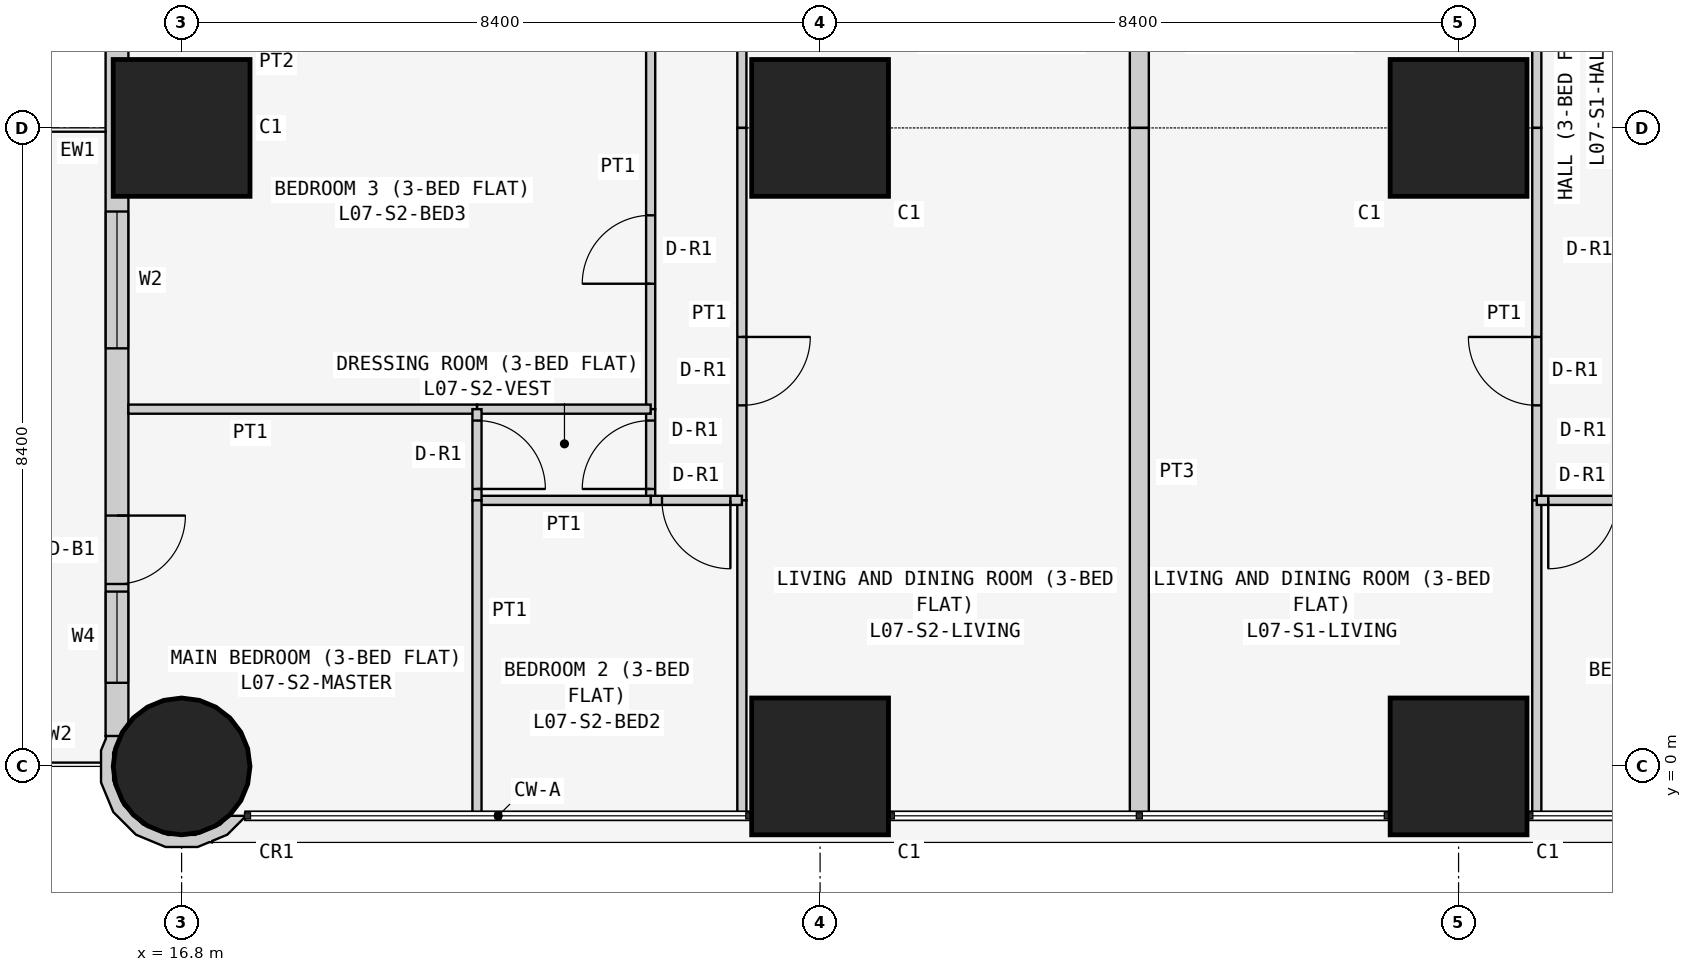
"""IFC4 building model, lengths in metres.
Left out: names, types, materials, properties, quantities, classifications, styles, units other than length and angle.
Written with IfcOpenShell. Run it as: python <this file> out.ifc"""

import sys

from ifc_helpers import new_model, si_unit, direction, frame, frame_2d, origin, origin_2d, place, context, subcontext, project, spatial, polyline, rectangle, circle, outline, extrude, element, fill, save


model = new_model("IFC4")
c1 = context("Model", 3, precision=1e-05, world=origin(), true_north=direction((0.0, 1.0)))
c2 = subcontext(c1, "Body", "Model", "MODEL_VIEW")
j1 = project(units=[si_unit("LENGTHUNIT", "METRE"), si_unit("PLANEANGLEUNIT", "RADIAN")], contexts=[c1])
p1 = place(None, origin())
s1 = spatial("IfcSite", under=j1, at=p1, CompositionType="ELEMENT")
p2 = place(p1, origin())
s2 = spatial("IfcBuilding", under=s1, at=p2, CompositionType="ELEMENT")
p3 = place(p2, frame((0.0, 0.0, 34.5)))
s3 = spatial("IfcBuildingStorey", under=s2, at=p3, CompositionType="ELEMENT", Elevation=34.5)
p4 = place(p3, frame((16.8, 0.0, 0.0), z_axis=(0.0, 0.0, 1.0), x_axis=(1.0, 0.0, 0.0)))
e1 = element("IfcColumn", 1, at=p4, inside=s3, PredefinedType="COLUMN", context=c2, shape_type="SweptSolid", body=[
    extrude(circle(Radius=0.9, at=origin_2d()), origin(), (0.0, 0.0, 1.0), 3.6),
])
for number, where, z_axis, x_axis in (
    (2, (16.8, 8.4, 0.0), (0.0, 0.0, 1.0), (1.0, 0.0, 0.0)),
    (3, (25.2, 0.0, 0.0), (0.0, 0.0, 1.0), (1.0, 0.0, 0.0)),
    (4, (25.2, 8.4, 0.0), (0.0, 0.0, 1.0), (1.0, 0.0, 0.0)),
    (5, (33.6, 0.0, 0.0), (0.0, 0.0, 1.0), (1.0, 0.0, 0.0)),
    (6, (33.6, 8.4, 0.0), (0.0, 0.0, 1.0), (1.0, 0.0, 0.0)),
):
    element("IfcColumn", number, at=place(p3, frame(where, z_axis=z_axis, x_axis=x_axis)), inside=s3, PredefinedType="COLUMN", context=c2, shape_type="SweptSolid", body=[
        extrude(rectangle(XDim=1.8, YDim=1.8, at=origin_2d()), origin(), (0.0, 0.0, 1.0), 3.6),
    ])
p5 = place(p3, frame((15.95, 15.8, 0.0), z_axis=(0.0, 0.0, 1.0), x_axis=(0.0, -1.0, 0.0)))
e7 = element("IfcWall", 7, at=p5, inside=s3, PredefinedType="SOLIDWALL", context=c2, shape_type="SweptSolid", body=[
    extrude(rectangle(XDim=15.4, YDim=0.3, at=frame_2d((7.7, 0.0))), origin(), (0.0, 0.0, 1.0), 3.45),
])
p6 = place(p5, frame((1.2, 0.0, 0.9)))
e8 = element("IfcOpeningElement", 8, at=p6, cuts=e7, PredefinedType="OPENING", context=c2, shape_type="SweptSolid", body=[
    extrude(rectangle(XDim=1.8, YDim=1.5, at=frame_2d((0.9, 0.75))), frame((0.0, 0.16, 0.0), z_axis=(0.0, -1.0, 0.0), x_axis=(1.0, 0.0, 0.0)), (0.0, 0.0, 1.0), 0.32),
])
p7 = place(p5, frame((4.95, 0.0, 1.5)))
e9 = element("IfcOpeningElement", 9, at=p7, cuts=e7, PredefinedType="OPENING", context=c2, shape_type="SweptSolid", body=[
    extrude(rectangle(XDim=0.9, YDim=0.7, at=frame_2d((0.45, 0.35))), frame((0.0, 0.16, 0.0), z_axis=(0.0, -1.0, 0.0), x_axis=(1.0, 0.0, 0.0)), (0.0, 0.0, 1.0), 0.32),
])
p8 = place(p5, frame((8.5, 0.0, 0.9)))
e10 = element("IfcOpeningElement", 10, at=p8, cuts=e7, PredefinedType="OPENING", context=c2, shape_type="SweptSolid", body=[
    extrude(rectangle(XDim=1.8, YDim=1.5, at=frame_2d((0.9, 0.75))), frame((0.0, 0.16, 0.0), z_axis=(0.0, -1.0, 0.0), x_axis=(1.0, 0.0, 0.0)), (0.0, 0.0, 1.0), 0.32),
])
p9 = place(p5, frame((12.5, 0.0, 0.0)))
e11 = element("IfcOpeningElement", 11, at=p9, cuts=e7, PredefinedType="OPENING", context=c2, shape_type="SweptSolid", body=[
    extrude(rectangle(XDim=0.9, YDim=2.4, at=frame_2d((0.45, 1.2))), frame((0.0, 0.16, 0.0), z_axis=(0.0, -1.0, 0.0), x_axis=(1.0, 0.0, 0.0)), (0.0, 0.0, 1.0), 0.32),
])
p10 = place(p5, frame((13.5, 0.0, 0.9)))
e12 = element("IfcOpeningElement", 12, at=p10, cuts=e7, PredefinedType="OPENING", context=c2, shape_type="SweptSolid", body=[
    extrude(rectangle(XDim=1.2, YDim=1.5, at=frame_2d((0.6, 0.75))), frame((0.0, 0.16, 0.0), z_axis=(0.0, -1.0, 0.0), x_axis=(1.0, 0.0, 0.0)), (0.0, 0.0, 1.0), 0.32),
])
p11 = place(p3, frame((15.89, 0.364, 0.0), z_axis=(0.0, 0.0, 1.0), x_axis=(-0.377204953059, -0.926129809145, 0.0)))
e13 = element("IfcWall", 13, at=p11, inside=s3, PredefinedType="SOLIDWALL", context=c2, shape_type="SweptSolid", body=[
    extrude(outline(polyline([(0.36, 1.803), (0.509, 1.741), (0.761, 1.486), (0.896, 1.154), (0.894, 0.795), (0.755, 0.465), (0.5, 0.213), (0.168, 0.078), (-0.1, 0.08), (0.001, -0.097), (0.03, -0.08), (0.199, -0.081), (0.589, 0.078), (0.889, 0.374), (1.053, 0.763), (1.055, 1.185), (0.896, 1.575), (0.778, 1.695), (0.769, 1.728), (0.75, 1.723), (0.6, 1.875), (0.295, 2.004), (0.281, 1.998), (0.36, 1.803)])), origin(), (0.0, 0.0, 1.0), 3.45),
])
p12 = place(p3, frame((34.629, 8.4, 0.0), z_axis=(0.0, 0.0, 1.0), x_axis=(0.0, 1.0, 0.0)))
e14 = element("IfcWall", 14, at=p12, inside=s3, PredefinedType="PARTITIONING", context=c2, shape_type="SweptSolid", body=[
    extrude(rectangle(XDim=2.4, YDim=0.12, at=frame_2d((1.2, 0.0))), origin(), (0.0, 0.0, 1.0), 3.45),
])
p13 = place(p3, frame((29.4, 10.8, 0.0), z_axis=(0.0, 0.0, 1.0), x_axis=(0.0, -1.0, 0.0)))
e15 = element("IfcWall", 15, at=p13, inside=s3, PredefinedType="PARTITIONING", context=c2, shape_type="SweptSolid", body=[
    extrude(rectangle(XDim=2.4, YDim=0.25, at=frame_2d((1.2, 0.0))), origin(), (0.0, 0.0, 1.0), 2.848),
])
p14 = place(p3, frame((34.629, 3.5, 0.0), z_axis=(0.0, 0.0, 1.0), x_axis=(0.0, 1.0, 0.0)))
e16 = element("IfcWall", 16, at=p14, inside=s3, PredefinedType="PARTITIONING", context=c2, shape_type="SweptSolid", body=[
    extrude(rectangle(XDim=4.9, YDim=0.12, at=frame_2d((2.45, 0.0))), origin(), (0.0, 0.0, 1.0), 3.45),
])
p15 = place(p14, frame((1.25, 0.0, 0.0)))
e17 = element("IfcOpeningElement", 17, at=p15, cuts=e16, PredefinedType="OPENING", context=c2, shape_type="SweptSolid", body=[
    extrude(rectangle(XDim=0.9, YDim=2.1, at=frame_2d((0.45, 1.05))), frame((0.0, 0.07, 0.0), z_axis=(0.0, -1.0, 0.0), x_axis=(1.0, 0.0, 0.0)), (0.0, 0.0, 1.0), 0.14),
])
p16 = place(p3, frame((34.629, -0.65, 0.0), z_axis=(0.0, 0.0, 1.0), x_axis=(0.0, 1.0, 0.0)))
e18 = element("IfcWall", 18, at=p16, inside=s3, PredefinedType="PARTITIONING", context=c2, shape_type="SweptSolid", body=[
    extrude(rectangle(XDim=4.15, YDim=0.12, at=frame_2d((2.075, 0.0))), origin(), (0.0, 0.0, 1.0), 3.45),
])
p17 = place(p3, frame((29.4, 8.4, 0.0), z_axis=(0.0, 0.0, 1.0), x_axis=(0.0, -1.0, 0.0)))
e19 = element("IfcWall", 19, at=p17, inside=s3, PredefinedType="PARTITIONING", context=c2, shape_type="SweptSolid", body=[
    extrude(rectangle(XDim=9.05, YDim=0.25, at=frame_2d((4.525, 0.0))), origin(), (0.0, 0.0, 1.0), 2.848),
])
p18 = place(p3, frame((34.629, 3.5, 0.0), z_axis=(0.0, 0.0, 1.0), x_axis=(1.0, 0.0, 0.0)))
e20 = element("IfcWall", 20, at=p18, inside=s3, PredefinedType="PARTITIONING", context=c2, shape_type="SweptSolid", body=[
    extrude(rectangle(XDim=1.2, YDim=0.12, at=frame_2d((0.6, 0.0))), origin(), (0.0, 0.0, 1.0), 3.45),
])
p19 = place(p18, frame((0.151, 0.0, 0.0)))
e21 = element("IfcOpeningElement", 21, at=p19, cuts=e20, PredefinedType="OPENING", context=c2, shape_type="SweptSolid", body=[
    extrude(rectangle(XDim=0.9, YDim=2.1, at=frame_2d((0.45, 1.05))), frame((0.0, 0.07, 0.0), z_axis=(0.0, -1.0, 0.0), x_axis=(1.0, 0.0, 0.0)), (0.0, 0.0, 1.0), 0.14),
])
p20 = place(p3, frame((24.171, 8.4, 0.0), z_axis=(0.0, 0.0, 1.0), x_axis=(0.0, 1.0, 0.0)))
e22 = element("IfcWall", 22, at=p20, inside=s3, PredefinedType="PARTITIONING", context=c2, shape_type="SweptSolid", body=[
    extrude(rectangle(XDim=2.4, YDim=0.12, at=frame_2d((1.2, 0.0))), origin(), (0.0, 0.0, 1.0), 3.45),
])
p21 = place(p3, frame((24.171, 3.5, 0.0), z_axis=(0.0, 0.0, 1.0), x_axis=(0.0, 1.0, 0.0)))
e23 = element("IfcWall", 23, at=p21, inside=s3, PredefinedType="PARTITIONING", context=c2, shape_type="SweptSolid", body=[
    extrude(rectangle(XDim=4.9, YDim=0.12, at=frame_2d((2.45, 0.0))), origin(), (0.0, 0.0, 1.0), 3.45),
])
p22 = place(p21, frame((1.25, 0.0, 0.0)))
e24 = element("IfcOpeningElement", 24, at=p22, cuts=e23, PredefinedType="OPENING", context=c2, shape_type="SweptSolid", body=[
    extrude(rectangle(XDim=0.9, YDim=2.1, at=frame_2d((0.45, 1.05))), frame((0.0, 0.07, 0.0), z_axis=(0.0, -1.0, 0.0), x_axis=(1.0, 0.0, 0.0)), (0.0, 0.0, 1.0), 0.14),
])
p23 = place(p3, frame((24.171, -0.65, 0.0), z_axis=(0.0, 0.0, 1.0), x_axis=(0.0, 1.0, 0.0)))
e25 = element("IfcWall", 25, at=p23, inside=s3, PredefinedType="PARTITIONING", context=c2, shape_type="SweptSolid", body=[
    extrude(rectangle(XDim=4.15, YDim=0.12, at=frame_2d((2.075, 0.0))), origin(), (0.0, 0.0, 1.0), 3.45),
])
p24 = place(p3, frame((22.971, 4.7, 0.0), z_axis=(0.0, 0.0, 1.0), x_axis=(0.0, 1.0, 0.0)))
e26 = element("IfcWall", 26, at=p24, inside=s3, PredefinedType="PARTITIONING", context=c2, shape_type="SweptSolid", body=[
    extrude(rectangle(XDim=4.9, YDim=0.12, at=frame_2d((2.45, 0.0))), origin(), (0.0, 0.0, 1.0), 3.45),
])
p25 = place(p24, frame((1.65, 0.0, 0.0)))
e27 = element("IfcOpeningElement", 27, at=p25, cuts=e26, PredefinedType="OPENING", context=c2, shape_type="SweptSolid", body=[
    extrude(rectangle(XDim=0.9, YDim=2.1, at=frame_2d((0.45, 1.05))), frame((0.0, 0.07, 0.0), z_axis=(0.0, -1.0, 0.0), x_axis=(1.0, 0.0, 0.0)), (0.0, 0.0, 1.0), 0.14),
])
p26 = place(p3, frame((22.971, 3.5, 0.0), z_axis=(0.0, 0.0, 1.0), x_axis=(0.0, 1.0, 0.0)))
e28 = element("IfcWall", 28, at=p26, inside=s3, PredefinedType="PARTITIONING", context=c2, shape_type="SweptSolid", body=[
    extrude(rectangle(XDim=1.2, YDim=0.12, at=frame_2d((0.6, 0.0))), origin(), (0.0, 0.0, 1.0), 3.45),
])
p27 = place(p26, frame((0.15, 0.0, 0.0)))
e29 = element("IfcOpeningElement", 29, at=p27, cuts=e28, PredefinedType="OPENING", context=c2, shape_type="SweptSolid", body=[
    extrude(rectangle(XDim=0.9, YDim=2.1, at=frame_2d((0.45, 1.05))), frame((0.0, 0.07, 0.0), z_axis=(0.0, -1.0, 0.0), x_axis=(1.0, 0.0, 0.0)), (0.0, 0.0, 1.0), 0.14),
])
p28 = place(p3, frame((24.171, 3.5, 0.0), z_axis=(0.0, 0.0, 1.0), x_axis=(-1.0, 0.0, 0.0)))
e30 = element("IfcWall", 30, at=p28, inside=s3, PredefinedType="PARTITIONING", context=c2, shape_type="SweptSolid", body=[
    extrude(rectangle(XDim=1.2, YDim=0.12, at=frame_2d((0.6, 0.0))), origin(), (0.0, 0.0, 1.0), 3.45),
])
p29 = place(p28, frame((0.151, 0.0, 0.0)))
e31 = element("IfcOpeningElement", 31, at=p29, cuts=e30, PredefinedType="OPENING", context=c2, shape_type="SweptSolid", body=[
    extrude(rectangle(XDim=0.9, YDim=2.1, at=frame_2d((0.45, 1.05))), frame((0.0, 0.07, 0.0), z_axis=(0.0, -1.0, 0.0), x_axis=(1.0, 0.0, 0.0)), (0.0, 0.0, 1.0), 0.14),
])
p30 = place(p3, frame((22.971, 4.7, 0.0), z_axis=(0.0, 0.0, 1.0), x_axis=(-1.0, 0.0, 0.0)))
e32 = element("IfcWall", 32, at=p30, inside=s3, PredefinedType="PARTITIONING", context=c2, shape_type="SweptSolid", body=[
    extrude(rectangle(XDim=2.285, YDim=0.12, at=frame_2d((1.143, 0.0))), origin(), (0.0, 0.0, 1.0), 3.45),
])
p31 = place(p3, frame((20.686, 4.7, 0.0), z_axis=(0.0, 0.0, 1.0), x_axis=(-1.0, 0.0, 0.0)))
e33 = element("IfcWall", 33, at=p31, inside=s3, PredefinedType="PARTITIONING", context=c2, shape_type="SweptSolid", body=[
    extrude(rectangle(XDim=4.586, YDim=0.12, at=frame_2d((2.293, 0.0))), origin(), (0.0, 0.0, 1.0), 3.45),
])
p32 = place(p3, frame((22.971, 3.5, 0.0), z_axis=(0.0, 0.0, 1.0), x_axis=(-1.0, 0.0, 0.0)))
e34 = element("IfcWall", 34, at=p32, inside=s3, PredefinedType="PARTITIONING", context=c2, shape_type="SweptSolid", body=[
    extrude(rectangle(XDim=2.285, YDim=0.12, at=frame_2d((1.143, 0.0))), origin(), (0.0, 0.0, 1.0), 3.45),
])
p33 = place(p3, frame((20.686, 3.5, 0.0), z_axis=(0.0, 0.0, 1.0), x_axis=(0.0, 1.0, 0.0)))
e35 = element("IfcWall", 35, at=p33, inside=s3, PredefinedType="PARTITIONING", context=c2, shape_type="SweptSolid", body=[
    extrude(rectangle(XDim=1.2, YDim=0.12, at=frame_2d((0.6, 0.0))), origin(), (0.0, 0.0, 1.0), 3.45),
])
p34 = place(p33, frame((0.15, 0.0, 0.0)))
e36 = element("IfcOpeningElement", 36, at=p34, cuts=e35, PredefinedType="OPENING", context=c2, shape_type="SweptSolid", body=[
    extrude(rectangle(XDim=0.9, YDim=2.1, at=frame_2d((0.45, 1.05))), frame((0.0, 0.07, 0.0), z_axis=(0.0, -1.0, 0.0), x_axis=(1.0, 0.0, 0.0)), (0.0, 0.0, 1.0), 0.14),
])
p35 = place(p3, frame((20.686, -0.65, 0.0), z_axis=(0.0, 0.0, 1.0), x_axis=(0.0, 1.0, 0.0)))
e37 = element("IfcWall", 37, at=p35, inside=s3, PredefinedType="PARTITIONING", context=c2, shape_type="SweptSolid", body=[
    extrude(rectangle(XDim=4.15, YDim=0.12, at=frame_2d((2.075, 0.0))), origin(), (0.0, 0.0, 1.0), 3.45),
])
p36 = place(p8, origin())
e38 = element("IfcWindow", 38, at=p36, inside=s3, PartitioningType="SINGLE_PANEL", PredefinedType="WINDOW", context=c2, shape_type="SweptSolid", body=[
    extrude(rectangle(XDim=1.8, YDim=1.5, at=frame_2d((0.9, 0.75))), frame((0.0, 0.03, 0.0), z_axis=(0.0, -1.0, 0.0), x_axis=(1.0, 0.0, 0.0)), (0.0, 0.0, 1.0), 0.06),
])
fill(e10, e38)
p37 = place(p9, origin())
e39 = element("IfcDoor", 39, at=p37, inside=s3, OperationType="SINGLE_SWING_LEFT", PredefinedType="DOOR", context=c2, shape_type="SweptSolid", body=[
    extrude(rectangle(XDim=0.9, YDim=2.4, at=frame_2d((0.45, 1.2))), frame((0.0, 0.025, 0.0), z_axis=(0.0, -1.0, 0.0), x_axis=(1.0, 0.0, 0.0)), (0.0, 0.0, 1.0), 0.05),
])
fill(e11, e39)
p38 = place(p10, origin())
e40 = element("IfcWindow", 40, at=p38, inside=s3, PartitioningType="SINGLE_PANEL", PredefinedType="WINDOW", context=c2, shape_type="SweptSolid", body=[
    extrude(rectangle(XDim=1.2, YDim=1.5, at=frame_2d((0.6, 0.75))), frame((0.0, 0.03, 0.0), z_axis=(0.0, -1.0, 0.0), x_axis=(1.0, 0.0, 0.0)), (0.0, 0.0, 1.0), 0.06),
])
fill(e12, e40)
p39 = place(p15, origin())
e41 = element("IfcDoor", 41, at=p39, inside=s3, OperationType="SINGLE_SWING_RIGHT", PredefinedType="DOOR", context=c2, shape_type="SweptSolid", body=[
    extrude(rectangle(XDim=0.9, YDim=2.1, at=frame_2d((0.45, 1.05))), frame((0.0, 0.025, 0.0), z_axis=(0.0, -1.0, 0.0), x_axis=(1.0, 0.0, 0.0)), (0.0, 0.0, 1.0), 0.05),
])
fill(e17, e41)
p40 = place(p19, frame((0.9, 0.0, 0.0), z_axis=(0.0, 0.0, 1.0), x_axis=(-1.0, 0.0, 0.0)))
e42 = element("IfcDoor", 42, at=p40, inside=s3, OperationType="SINGLE_SWING_RIGHT", PredefinedType="DOOR", context=c2, shape_type="SweptSolid", body=[
    extrude(rectangle(XDim=0.9, YDim=2.1, at=frame_2d((0.45, 1.05))), frame((0.0, 0.025, 0.0), z_axis=(0.0, -1.0, 0.0), x_axis=(1.0, 0.0, 0.0)), (0.0, 0.0, 1.0), 0.05),
])
fill(e21, e42)
p41 = place(p22, frame((0.9, 0.0, 0.0), z_axis=(0.0, 0.0, 1.0), x_axis=(-1.0, 0.0, 0.0)))
e43 = element("IfcDoor", 43, at=p41, inside=s3, OperationType="SINGLE_SWING_LEFT", PredefinedType="DOOR", context=c2, shape_type="SweptSolid", body=[
    extrude(rectangle(XDim=0.9, YDim=2.1, at=frame_2d((0.45, 1.05))), frame((0.0, 0.025, 0.0), z_axis=(0.0, -1.0, 0.0), x_axis=(1.0, 0.0, 0.0)), (0.0, 0.0, 1.0), 0.05),
])
fill(e24, e43)
p42 = place(p25, origin())
e44 = element("IfcDoor", 44, at=p42, inside=s3, OperationType="SINGLE_SWING_LEFT", PredefinedType="DOOR", context=c2, shape_type="SweptSolid", body=[
    extrude(rectangle(XDim=0.9, YDim=2.1, at=frame_2d((0.45, 1.05))), frame((0.0, 0.025, 0.0), z_axis=(0.0, -1.0, 0.0), x_axis=(1.0, 0.0, 0.0)), (0.0, 0.0, 1.0), 0.05),
])
fill(e27, e44)
p43 = place(p27, origin())
e45 = element("IfcDoor", 45, at=p43, inside=s3, OperationType="SINGLE_SWING_LEFT", PredefinedType="DOOR", context=c2, shape_type="SweptSolid", body=[
    extrude(rectangle(XDim=0.9, YDim=2.1, at=frame_2d((0.45, 1.05))), frame((0.0, 0.025, 0.0), z_axis=(0.0, -1.0, 0.0), x_axis=(1.0, 0.0, 0.0)), (0.0, 0.0, 1.0), 0.05),
])
fill(e29, e45)
p44 = place(p34, frame((0.9, 0.0, 0.0), z_axis=(0.0, 0.0, 1.0), x_axis=(-1.0, 0.0, 0.0)))
e46 = element("IfcDoor", 46, at=p44, inside=s3, OperationType="SINGLE_SWING_RIGHT", PredefinedType="DOOR", context=c2, shape_type="SweptSolid", body=[
    extrude(rectangle(XDim=0.9, YDim=2.1, at=frame_2d((0.45, 1.05))), frame((0.0, 0.025, 0.0), z_axis=(0.0, -1.0, 0.0), x_axis=(1.0, 0.0, 0.0)), (0.0, 0.0, 1.0), 0.05),
])
fill(e36, e46)
p45 = place(p29, origin())
e47 = element("IfcDoor", 47, at=p45, inside=s3, OperationType="SINGLE_SWING_LEFT", PredefinedType="DOOR", context=c2, shape_type="SweptSolid", body=[
    extrude(rectangle(XDim=0.9, YDim=2.1, at=frame_2d((0.45, 1.05))), frame((0.0, 0.025, 0.0), z_axis=(0.0, -1.0, 0.0), x_axis=(1.0, 0.0, 0.0)), (0.0, 0.0, 1.0), 0.05),
])
fill(e31, e47)
save(model, sys.argv[1])
